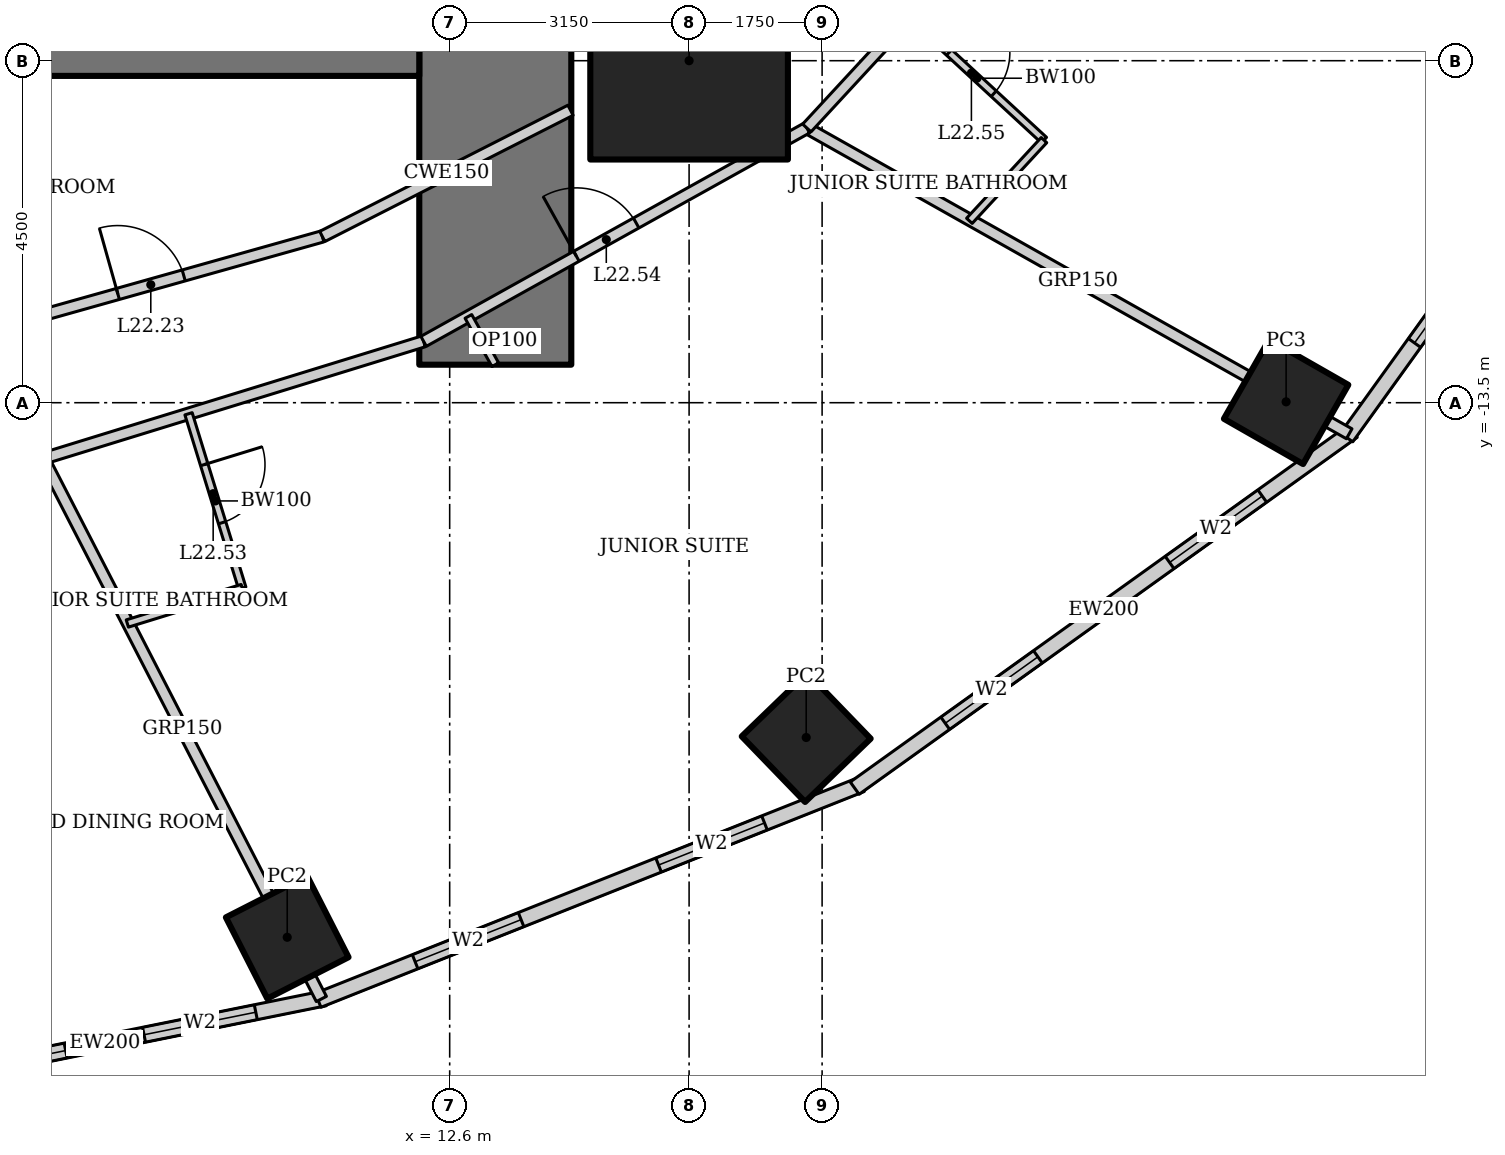
"""IFC4 building model, lengths in metres.
Left out: names, types, materials, properties, quantities, classifications, styles, units other than length and angle.
Written with IfcOpenShell. Run it as: python <this file> out.ifc"""

import sys

from ifc_helpers import new_model, si_unit, direction, frame, frame_2d, origin, origin_2d, place, context, subcontext, project, spatial, rectangle, hollow_rectangle, extrude, element, fill, save


model = new_model("IFC4")
c1 = context("Model", 3, precision=1e-05, world=origin(), true_north=direction((0.0, 1.0)))
c2 = subcontext(c1, "Body", "Model", "MODEL_VIEW")
j1 = project(units=[si_unit("LENGTHUNIT", "METRE"), si_unit("PLANEANGLEUNIT", "RADIAN")], contexts=[c1])
p1 = place(None, origin())
s1 = spatial("IfcSite", under=j1, at=p1, CompositionType="ELEMENT")
p2 = place(p1, origin())
s2 = spatial("IfcBuilding", under=s1, at=p2, CompositionType="ELEMENT")
p3 = place(p2, frame((0.0, 0.0, 94.6)))
s3 = spatial("IfcBuildingStorey", under=s2, at=p3, CompositionType="ELEMENT", Elevation=94.6)
p4 = place(p3, frame((15.75, -9.0, 0.0), z_axis=(0.0, 0.0, 1.0), x_axis=(1.0, 0.0, 0.0)))
e1 = element("IfcColumn", 1, at=p4, inside=s3, PredefinedType="COLUMN", context=c2, shape_type="SweptSolid", body=[
    extrude(hollow_rectangle(XDim=2.6, YDim=2.6, WallThickness=0.13, at=origin_2d()), origin(), (0.0, 0.0, 1.0), 3.6),
])
for number, where, z_axis, x_axis in (
    (2, (10.463, -20.534, 0.0), (0.0, 0.0, 1.0), (0.891, 0.454, 0.0)),
    (3, (17.291, -17.905, 0.0), (0.0, 0.0, 1.0), (0.719, 0.695, 0.0)),
):
    element("IfcColumn", number, at=place(p3, frame(where, z_axis=z_axis, x_axis=x_axis)), inside=s3, PredefinedType="COLUMN", context=c2, shape_type="SweptSolid", body=[
        extrude(hollow_rectangle(XDim=1.2, YDim=1.2, WallThickness=0.1, at=origin_2d()), origin(), (0.0, 0.0, 1.0), 3.6),
    ])
p5 = place(p3, frame((23.605, -13.489, 0.0), z_axis=(0.0, 0.0, 1.0), x_axis=(0.496139221777, 0.86824298017, 0.0)))
e4 = element("IfcColumn", 4, at=p5, inside=s3, PredefinedType="COLUMN", context=c2, shape_type="SweptSolid", body=[
    extrude(hollow_rectangle(XDim=1.2, YDim=1.2, WallThickness=0.12, at=origin_2d()), origin(), (0.0, 0.0, 1.0), 3.6),
])
p6 = place(p3, frame((13.2, -13.0, 0.0), z_axis=(0.0, 0.0, 1.0), x_axis=(0.0, 1.0, 0.0)))
e5 = element("IfcWall", 5, at=p6, inside=s3, PredefinedType="SHEAR", context=c2, shape_type="SweptSolid", body=[
    extrude(rectangle(XDim=26.0, YDim=2.0, at=frame_2d((13.0, 0.0))), origin(), (0.0, 0.0, 1.0), 3.6),
])
p7 = place(p6, frame((12.1, 0.0, 0.0)))
e6 = element("IfcOpeningElement", 6, at=p7, cuts=e5, PredefinedType="OPENING", context=c2, shape_type="SweptSolid", body=[
    extrude(rectangle(XDim=1.8, YDim=2.1, at=frame_2d((0.9, 1.05))), frame((0.0, 1.01, 0.0), z_axis=(0.0, -1.0, 0.0), x_axis=(1.0, 0.0, 0.0)), (0.0, 0.0, 1.0), 2.02),
])
p8 = place(p3, frame((-12.2, -8.0, 0.0), z_axis=(0.0, 0.0, 1.0), x_axis=(1.0, 0.0, 0.0)))
e7 = element("IfcWall", 7, at=p8, inside=s3, PredefinedType="SHEAR", context=c2, shape_type="SweptSolid", body=[
    extrude(rectangle(XDim=24.4, YDim=2.4, at=frame_2d((12.2, 0.0))), origin(), (0.0, 0.0, 1.0), 3.6),
])
p9 = place(p3, frame((5.17, -22.504, 0.0), z_axis=(0.0, 0.0, 1.0), x_axis=(0.980251657452, 0.197754110105, 0.0)))
e8 = element("IfcWall", 8, at=p9, inside=s3, PredefinedType="SOLIDWALL", context=c2, shape_type="SweptSolid", body=[
    extrude(rectangle(XDim=5.904, YDim=0.2, at=frame_2d((2.952, 0.0))), origin(), (0.0, 0.0, 1.0), 3.45),
])
p10 = place(p9, frame((0.926, 0.0, 0.5)))
e9 = element("IfcOpeningElement", 9, at=p10, cuts=e8, PredefinedType="OPENING", context=c2, shape_type="SweptSolid", body=[
    extrude(rectangle(XDim=1.5, YDim=2.2, at=frame_2d((0.75, 1.1))), frame((0.0, 0.11, 0.0), z_axis=(0.0, -1.0, 0.0), x_axis=(1.0, 0.0, 0.0)), (0.0, 0.0, 1.0), 0.22),
])
p11 = place(p9, frame((3.478, 0.0, 0.5)))
e10 = element("IfcOpeningElement", 10, at=p11, cuts=e8, PredefinedType="OPENING", context=c2, shape_type="SweptSolid", body=[
    extrude(rectangle(XDim=1.5, YDim=2.2, at=frame_2d((0.75, 1.1))), frame((0.0, 0.11, 0.0), z_axis=(0.0, -1.0, 0.0), x_axis=(1.0, 0.0, 0.0)), (0.0, 0.0, 1.0), 0.22),
])
p12 = place(p3, frame((10.869, -21.363, 0.0), z_axis=(0.0, 0.0, 1.0), x_axis=(0.929358351251, 0.369178892895, 0.0)))
e11 = element("IfcWall", 11, at=p12, inside=s3, PredefinedType="SOLIDWALL", context=c2, shape_type="SweptSolid", body=[
    extrude(rectangle(XDim=7.692, YDim=0.2, at=frame_2d((3.846, 0.0))), origin(), (0.0, 0.0, 1.0), 3.45),
])
p13 = place(p12, frame((1.373, 0.0, 0.5)))
e12 = element("IfcOpeningElement", 12, at=p13, cuts=e11, PredefinedType="OPENING", context=c2, shape_type="SweptSolid", body=[
    extrude(rectangle(XDim=1.5, YDim=2.2, at=frame_2d((0.75, 1.1))), frame((0.0, 0.11, 0.0), z_axis=(0.0, -1.0, 0.0), x_axis=(1.0, 0.0, 0.0)), (0.0, 0.0, 1.0), 0.22),
])
p14 = place(p12, frame((4.819, 0.0, 0.5)))
e13 = element("IfcOpeningElement", 13, at=p14, cuts=e11, PredefinedType="OPENING", context=c2, shape_type="SweptSolid", body=[
    extrude(rectangle(XDim=1.5, YDim=2.2, at=frame_2d((0.75, 1.1))), frame((0.0, 0.11, 0.0), z_axis=(0.0, -1.0, 0.0), x_axis=(1.0, 0.0, 0.0)), (0.0, 0.0, 1.0), 0.22),
])
p15 = place(p3, frame((17.929, -18.572, 0.0), z_axis=(0.0, 0.0, 1.0), x_axis=(0.812791321576, 0.582554948112, 0.0)))
e14 = element("IfcWall", 14, at=p15, inside=s3, PredefinedType="SOLIDWALL", context=c2, shape_type="SweptSolid", body=[
    extrude(rectangle(XDim=8.063, YDim=0.2, at=frame_2d((4.032, 0.0))), origin(), (0.0, 0.0, 1.0), 3.45),
])
p16 = place(p15, frame((1.466, 0.0, 0.5)))
e15 = element("IfcOpeningElement", 15, at=p16, cuts=e14, PredefinedType="OPENING", context=c2, shape_type="SweptSolid", body=[
    extrude(rectangle(XDim=1.5, YDim=2.2, at=frame_2d((0.75, 1.1))), frame((0.0, 0.11, 0.0), z_axis=(0.0, -1.0, 0.0), x_axis=(1.0, 0.0, 0.0)), (0.0, 0.0, 1.0), 0.22),
])
p17 = place(p15, frame((5.097, 0.0, 0.5)))
e16 = element("IfcOpeningElement", 16, at=p17, cuts=e14, PredefinedType="OPENING", context=c2, shape_type="SweptSolid", body=[
    extrude(rectangle(XDim=1.5, YDim=2.2, at=frame_2d((0.75, 1.1))), frame((0.0, 0.11, 0.0), z_axis=(0.0, -1.0, 0.0), x_axis=(1.0, 0.0, 0.0)), (0.0, 0.0, 1.0), 0.22),
])
p18 = place(p3, frame((24.4, -13.957, 0.0), z_axis=(0.0, 0.0, 1.0), x_axis=(0.583937613703, 0.811798536155, 0.0)))
e17 = element("IfcWall", 17, at=p18, inside=s3, PredefinedType="SOLIDWALL", context=c2, shape_type="SweptSolid", body=[
    extrude(rectangle(XDim=8.323, YDim=0.2, at=frame_2d((4.162, 0.0))), origin(), (0.0, 0.0, 1.0), 3.45),
])
p19 = place(p18, frame((1.531, 0.0, 0.5)))
e18 = element("IfcOpeningElement", 18, at=p19, cuts=e17, PredefinedType="OPENING", context=c2, shape_type="SweptSolid", body=[
    extrude(rectangle(XDim=1.5, YDim=2.2, at=frame_2d((0.75, 1.1))), frame((0.0, 0.11, 0.0), z_axis=(0.0, -1.0, 0.0), x_axis=(1.0, 0.0, 0.0)), (0.0, 0.0, 1.0), 0.22),
])
p20 = place(p18, frame((5.292, 0.0, 0.5)))
e19 = element("IfcOpeningElement", 19, at=p20, cuts=e17, PredefinedType="OPENING", context=c2, shape_type="SweptSolid", body=[
    extrude(rectangle(XDim=1.5, YDim=2.2, at=frame_2d((0.75, 1.1))), frame((0.0, 0.11, 0.0), z_axis=(0.0, -1.0, 0.0), x_axis=(1.0, 0.0, 0.0)), (0.0, 0.0, 1.0), 0.22),
])
p21 = place(p3, frame((10.912, -21.346, 0.0), z_axis=(0.0, 0.0, 1.0), x_axis=(-0.45752665959, 0.889195904042, 0.0)))
e20 = element("IfcWall", 20, at=p21, inside=s3, PredefinedType="PARTITIONING", context=c2, shape_type="SweptSolid", body=[
    extrude(rectangle(XDim=7.997, YDim=0.15, at=frame_2d((3.999, 0.0))), origin(), (0.0, 0.0, 1.0), 2.528),
])
p22 = place(p3, frame((24.435, -13.909, 0.0), z_axis=(0.0, 0.0, 1.0), x_axis=(-0.871075246657, 0.491149584813, 0.0)))
e21 = element("IfcWall", 21, at=p22, inside=s3, PredefinedType="PARTITIONING", context=c2, shape_type="SweptSolid", body=[
    extrude(rectangle(XDim=8.192, YDim=0.15, at=frame_2d((4.096, 0.0))), origin(), (0.0, 0.0, 1.0), 2.693),
])
p23 = place(p3, frame((7.253, -14.235, 0.0), z_axis=(0.0, 0.0, 1.0), x_axis=(0.955657956744, 0.294478980085, 0.0)))
e22 = element("IfcWall", 22, at=p23, inside=s3, PredefinedType="PARTITIONING", context=c2, shape_type="SweptSolid", body=[
    extrude(rectangle(XDim=5.236, YDim=0.15, at=frame_2d((2.618, 0.0))), origin(), (0.0, 0.0, 1.0), 3.45),
])
p24 = place(p3, frame((12.257, -12.693, 0.0), z_axis=(0.0, 0.0, 1.0), x_axis=(0.873695910579, 0.486472461541, 0.0)))
e23 = element("IfcWall", 23, at=p24, inside=s3, PredefinedType="PARTITIONING", context=c2, shape_type="SweptSolid", body=[
    extrude(rectangle(XDim=5.771, YDim=0.15, at=frame_2d((2.885, 0.0))), origin(), (0.0, 0.0, 1.0), 3.45),
])
p25 = place(p24, frame((2.301, 0.0, 0.0)))
e24 = element("IfcOpeningElement", 24, at=p25, cuts=e23, PredefinedType="OPENING", context=c2, shape_type="SweptSolid", body=[
    extrude(rectangle(XDim=0.9, YDim=2.1, at=frame_2d((0.45, 1.05))), frame((0.0, 0.085, 0.0), z_axis=(0.0, -1.0, 0.0), x_axis=(1.0, 0.0, 0.0)), (0.0, 0.0, 1.0), 0.17),
])
p26 = place(p3, frame((17.299, -9.885, 0.0), z_axis=(0.0, 0.0, 1.0), x_axis=(0.678641806296, 0.734469399463, 0.0)))
e25 = element("IfcWall", 25, at=p26, inside=s3, PredefinedType="PARTITIONING", context=c2, shape_type="SweptSolid", body=[
    extrude(rectangle(XDim=6.166, YDim=0.15, at=frame_2d((3.083, 0.0))), origin(), (0.0, 0.0, 1.0), 3.45),
])
p27 = place(p3, frame((6.411, -12.582, 0.0), z_axis=(0.0, 0.0, 1.0), x_axis=(0.962643729928, 0.270771211967, 0.0)))
e26 = element("IfcWall", 26, at=p27, inside=s3, PredefinedType="PARTITIONING", context=c2, shape_type="SweptSolid", body=[
    extrude(rectangle(XDim=4.688, YDim=0.15, at=frame_2d((2.344, 0.0))), origin(), (0.0, 0.0, 1.0), 3.45),
])
p28 = place(p27, frame((1.894, 0.0, 0.0)))
e27 = element("IfcOpeningElement", 27, at=p28, cuts=e26, PredefinedType="OPENING", context=c2, shape_type="SweptSolid", body=[
    extrude(rectangle(XDim=0.9, YDim=2.1, at=frame_2d((0.45, 1.05))), frame((0.0, 0.085, 0.0), z_axis=(0.0, -1.0, 0.0), x_axis=(1.0, 0.0, 0.0)), (0.0, 0.0, 1.0), 0.17),
])
p29 = place(p3, frame((9.164, -13.646, 0.0), z_axis=(0.0, 0.0, 1.0), x_axis=(0.294507586191, -0.955649141514, 0.0)))
e28 = element("IfcWall", 28, at=p29, inside=s3, PredefinedType="PARTITIONING", context=c2, shape_type="SweptSolid", body=[
    extrude(rectangle(XDim=2.4, YDim=0.1, at=frame_2d((1.2, 0.0))), origin(), (0.0, 0.0, 1.0), 3.45),
])
p30 = place(p29, frame((0.7, 0.0, 0.0)))
e29 = element("IfcOpeningElement", 29, at=p30, cuts=e28, PredefinedType="OPENING", context=c2, shape_type="SweptSolid", body=[
    extrude(rectangle(XDim=0.8, YDim=2.1, at=frame_2d((0.4, 1.05))), frame((0.0, 0.06, 0.0), z_axis=(0.0, -1.0, 0.0), x_axis=(1.0, 0.0, 0.0)), (0.0, 0.0, 1.0), 0.12),
])
p31 = place(p3, frame((9.871, -15.939, 0.0), z_axis=(0.0, 0.0, 1.0), x_axis=(-0.955642133669, -0.29453032502, 0.0)))
e30 = element("IfcWall", 30, at=p31, inside=s3, PredefinedType="PARTITIONING", context=c2, shape_type="SweptSolid", body=[
    extrude(rectangle(XDim=1.583, YDim=0.1, at=frame_2d((0.791, 0.0))), origin(), (0.0, 0.0, 1.0), 3.45),
])
p32 = place(p3, frame((18.656, -8.416, 0.0), z_axis=(0.0, 0.0, 1.0), x_axis=(0.73447964986, -0.678630712495, 0.0)))
e31 = element("IfcWall", 31, at=p32, inside=s3, PredefinedType="PARTITIONING", context=c2, shape_type="SweptSolid", body=[
    extrude(rectangle(XDim=2.4, YDim=0.1, at=frame_2d((1.2, 0.0))), origin(), (0.0, 0.0, 1.0), 3.45),
])
p33 = place(p32, frame((0.7, 0.0, 0.0)))
e32 = element("IfcOpeningElement", 32, at=p33, cuts=e31, PredefinedType="OPENING", context=c2, shape_type="SweptSolid", body=[
    extrude(rectangle(XDim=0.8, YDim=2.1, at=frame_2d((0.4, 1.05))), frame((0.0, 0.06, 0.0), z_axis=(0.0, -1.0, 0.0), x_axis=(1.0, 0.0, 0.0)), (0.0, 0.0, 1.0), 0.12),
])
p34 = place(p3, frame((20.419, -10.045, 0.0), z_axis=(0.0, 0.0, 1.0), x_axis=(-0.67861657312, -0.734492713842, 0.0)))
e33 = element("IfcWall", 33, at=p34, inside=s3, PredefinedType="PARTITIONING", context=c2, shape_type="SweptSolid", body=[
    extrude(rectangle(XDim=1.446, YDim=0.1, at=frame_2d((0.723, 0.0))), origin(), (0.0, 0.0, 1.0), 3.45),
])
p35 = place(p3, frame((13.2, -13.0, 0.0), z_axis=(0.0, 0.0, 1.0), x_axis=(-0.486383760903, 0.873745293051, 0.0)))
e34 = element("IfcWall", 34, at=p35, inside=s3, PredefinedType="PARTITIONING", context=c2, shape_type="SweptSolid", body=[
    extrude(rectangle(XDim=0.727, YDim=0.1, at=frame_2d((0.364, 0.0))), origin(), (0.0, 0.0, 1.0), 3.45),
])
p36 = place(p3, frame((10.924, -11.312, 0.0), z_axis=(0.0, 0.0, 1.0), x_axis=(0.891394713219, 0.453227829292, 0.0)))
e35 = element("IfcWall", 35, at=p36, inside=s3, PredefinedType="PARTITIONING", context=c2, shape_type="SweptSolid", body=[
    extrude(rectangle(XDim=3.664, YDim=0.15, at=frame_2d((1.832, 0.0))), origin(), (0.0, 0.0, 1.0), 3.45),
])
p37 = place(p10, origin())
e36 = element("IfcWindow", 36, at=p37, inside=s3, PartitioningType="SINGLE_PANEL", PredefinedType="WINDOW", context=c2, shape_type="SweptSolid", body=[
    extrude(rectangle(XDim=1.5, YDim=2.2, at=frame_2d((0.75, 1.1))), frame((0.0, 0.03, 0.0), z_axis=(0.0, -1.0, 0.0), x_axis=(1.0, 0.0, 0.0)), (0.0, 0.0, 1.0), 0.06),
])
fill(e9, e36)
p38 = place(p11, origin())
e37 = element("IfcWindow", 37, at=p38, inside=s3, PartitioningType="SINGLE_PANEL", PredefinedType="WINDOW", context=c2, shape_type="SweptSolid", body=[
    extrude(rectangle(XDim=1.5, YDim=2.2, at=frame_2d((0.75, 1.1))), frame((0.0, 0.03, 0.0), z_axis=(0.0, -1.0, 0.0), x_axis=(1.0, 0.0, 0.0)), (0.0, 0.0, 1.0), 0.06),
])
fill(e10, e37)
p39 = place(p13, origin())
e38 = element("IfcWindow", 38, at=p39, inside=s3, PartitioningType="SINGLE_PANEL", PredefinedType="WINDOW", context=c2, shape_type="SweptSolid", body=[
    extrude(rectangle(XDim=1.5, YDim=2.2, at=frame_2d((0.75, 1.1))), frame((0.0, 0.03, 0.0), z_axis=(0.0, -1.0, 0.0), x_axis=(1.0, 0.0, 0.0)), (0.0, 0.0, 1.0), 0.06),
])
fill(e12, e38)
p40 = place(p14, origin())
e39 = element("IfcWindow", 39, at=p40, inside=s3, PartitioningType="SINGLE_PANEL", PredefinedType="WINDOW", context=c2, shape_type="SweptSolid", body=[
    extrude(rectangle(XDim=1.5, YDim=2.2, at=frame_2d((0.75, 1.1))), frame((0.0, 0.03, 0.0), z_axis=(0.0, -1.0, 0.0), x_axis=(1.0, 0.0, 0.0)), (0.0, 0.0, 1.0), 0.06),
])
fill(e13, e39)
p41 = place(p16, origin())
e40 = element("IfcWindow", 40, at=p41, inside=s3, PartitioningType="SINGLE_PANEL", PredefinedType="WINDOW", context=c2, shape_type="SweptSolid", body=[
    extrude(rectangle(XDim=1.5, YDim=2.2, at=frame_2d((0.75, 1.1))), frame((0.0, 0.03, 0.0), z_axis=(0.0, -1.0, 0.0), x_axis=(1.0, 0.0, 0.0)), (0.0, 0.0, 1.0), 0.06),
])
fill(e15, e40)
p42 = place(p17, origin())
e41 = element("IfcWindow", 41, at=p42, inside=s3, PartitioningType="SINGLE_PANEL", PredefinedType="WINDOW", context=c2, shape_type="SweptSolid", body=[
    extrude(rectangle(XDim=1.5, YDim=2.2, at=frame_2d((0.75, 1.1))), frame((0.0, 0.03, 0.0), z_axis=(0.0, -1.0, 0.0), x_axis=(1.0, 0.0, 0.0)), (0.0, 0.0, 1.0), 0.06),
])
fill(e16, e41)
p43 = place(p19, origin())
e42 = element("IfcWindow", 42, at=p43, inside=s3, PartitioningType="SINGLE_PANEL", PredefinedType="WINDOW", context=c2, shape_type="SweptSolid", body=[
    extrude(rectangle(XDim=1.5, YDim=2.2, at=frame_2d((0.75, 1.1))), frame((0.0, 0.03, 0.0), z_axis=(0.0, -1.0, 0.0), x_axis=(1.0, 0.0, 0.0)), (0.0, 0.0, 1.0), 0.06),
])
fill(e18, e42)
p44 = place(p28, origin())
e43 = element("IfcDoor", 43, at=p44, inside=s3, OperationType="SINGLE_SWING_LEFT", PredefinedType="DOOR", context=c2, shape_type="SweptSolid", body=[
    extrude(rectangle(XDim=0.9, YDim=2.1, at=frame_2d((0.45, 1.05))), frame((0.0, 0.025, 0.0), z_axis=(0.0, -1.0, 0.0), x_axis=(1.0, 0.0, 0.0)), (0.0, 0.0, 1.0), 0.05),
])
fill(e27, e43)
p45 = place(p30, origin())
e44 = element("IfcDoor", 44, at=p45, inside=s3, OperationType="SINGLE_SWING_LEFT", PredefinedType="DOOR", context=c2, shape_type="SweptSolid", body=[
    extrude(rectangle(XDim=0.8, YDim=2.1, at=frame_2d((0.4, 1.05))), frame((0.0, 0.025, 0.0), z_axis=(0.0, -1.0, 0.0), x_axis=(1.0, 0.0, 0.0)), (0.0, 0.0, 1.0), 0.05),
])
fill(e29, e44)
p46 = place(p25, origin())
e45 = element("IfcDoor", 45, at=p46, inside=s3, OperationType="SINGLE_SWING_LEFT", PredefinedType="DOOR", context=c2, shape_type="SweptSolid", body=[
    extrude(rectangle(XDim=0.9, YDim=2.1, at=frame_2d((0.45, 1.05))), frame((0.0, 0.025, 0.0), z_axis=(0.0, -1.0, 0.0), x_axis=(1.0, 0.0, 0.0)), (0.0, 0.0, 1.0), 0.05),
])
fill(e24, e45)
p47 = place(p33, origin())
e46 = element("IfcDoor", 46, at=p47, inside=s3, OperationType="SINGLE_SWING_LEFT", PredefinedType="DOOR", context=c2, shape_type="SweptSolid", body=[
    extrude(rectangle(XDim=0.8, YDim=2.1, at=frame_2d((0.4, 1.05))), frame((0.0, 0.025, 0.0), z_axis=(0.0, -1.0, 0.0), x_axis=(1.0, 0.0, 0.0)), (0.0, 0.0, 1.0), 0.05),
])
fill(e32, e46)
save(model, sys.argv[1])
